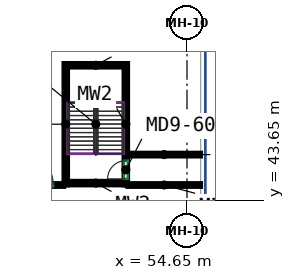
"""IFC4 building model, lengths in metres.
Left out: names, types, materials, properties, quantities, classifications, styles, units other than length and angle.
Written with IfcOpenShell. Run it as: python <this file> out.ifc"""

import sys

from ifc_helpers import new_model, si_unit, direction, frame, frame_2d, origin, place, context, subcontext, project, spatial, rectangle, extrude, source, transform, mapped, element, fill, save


model = new_model("IFC4")
c1 = context("Model", 3, precision=1e-05, world=origin(), true_north=direction((0.0, 1.0)))
c2 = subcontext(c1, "Body", "Model", "MODEL_VIEW")
j1 = project(units=[si_unit("LENGTHUNIT", "METRE"), si_unit("PLANEANGLEUNIT", "RADIAN")], contexts=[c1])
p1 = place(None, origin())
s1 = spatial("IfcSite", under=j1, at=p1, CompositionType="ELEMENT")
p2 = place(p1, origin())
s2 = spatial("IfcBuilding", under=s1, at=p2, CompositionType="ELEMENT")
p3 = place(p2, origin())
s3 = spatial("IfcBuildingStorey", under=s2, at=p3, CompositionType="ELEMENT", Elevation=0.0)
m1 = source(origin(), c2, "Body", "SweptSolid", [
    extrude(rectangle(XDim=8.0, YDim=0.25, at=frame_2d((4.0, 0.0))), origin(), (0.0, 0.0, 1.0), 8.6),
])
p4 = place(p3, frame((46.675, 44.65, 0.0), z_axis=(0.0, 0.0, 1.0), x_axis=(0.0, 1.0, 0.0)))
e1 = element("IfcWall", 1, at=p4, inside=s3, PredefinedType="SHEAR", context=c2, shape_type="MappedRepresentation", body=[
    mapped(m1, transform((0.0, 0.0, 0.0))),
])
p5 = place(p3, frame((50.625, 44.65, 0.0), z_axis=(0.0, 0.0, 1.0), x_axis=(0.0, 1.0, 0.0)))
e2 = element("IfcWall", 2, at=p5, inside=s3, PredefinedType="SHEAR", context=c2, shape_type="MappedRepresentation", body=[
    mapped(m1, transform((0.0, 0.0, 0.0))),
])
p6 = place(p5, frame((0.4, 0.0, 0.0)))
e3 = element("IfcOpeningElement", 3, at=p6, cuts=e2, PredefinedType="OPENING", context=c2, shape_type="SweptSolid", body=[
    extrude(rectangle(XDim=1.2, YDim=2.1, at=frame_2d((0.6, 1.05))), frame((0.0, 0.135, 0.0), z_axis=(0.0, -1.0, 0.0), x_axis=(1.0, 0.0, 0.0)), (0.0, 0.0, 1.0), 0.27),
])
m2 = source(origin(), c2, "Body", "SweptSolid", [
    extrude(rectangle(XDim=3.7, YDim=0.25, at=frame_2d((1.85, 0.0))), origin(), (0.0, 0.0, 1.0), 8.6),
])
for number, where, z_axis, x_axis in (
    (4, (46.8, 44.775, 0.0), (0.0, 0.0, 1.0), (1.0, 0.0, 0.0)),
    (5, (46.8, 52.525, 0.0), (0.0, 0.0, 1.0), (1.0, 0.0, 0.0)),
):
    element("IfcWall", number, at=place(p3, frame(where, z_axis=z_axis, x_axis=x_axis)), inside=s3, PredefinedType="SHEAR", context=c2, shape_type="MappedRepresentation", body=[
        mapped(m2, transform((0.0, 0.0, 0.0))),
    ])
m3 = source(origin(), c2, "Body", "SweptSolid", [
    extrude(rectangle(XDim=28.7, YDim=0.3, at=frame_2d((14.35, 0.0))), origin(), (0.0, 0.0, 1.0), 8.6),
])
p7 = place(p3, frame((55.7, 56.85, 0.0), z_axis=(0.0, 0.0, 1.0), x_axis=(0.0, -1.0, 0.0)))
e6 = element("IfcWall", 6, at=p7, inside=s3, PredefinedType="SOLIDWALL", context=c2, shape_type="MappedRepresentation", body=[
    mapped(m3, transform((0.0, 0.0, 0.0))),
])
p8 = place(p7, frame((23.1, 0.0, 0.0)))
e7 = element("IfcOpeningElement", 7, at=p8, cuts=e6, PredefinedType="OPENING", context=c2, shape_type="SweptSolid", body=[
    extrude(rectangle(XDim=1.5, YDim=2.4, at=frame_2d((0.75, 1.2))), frame((0.0, 0.16, 0.0), z_axis=(0.0, -1.0, 0.0), x_axis=(1.0, 0.0, 0.0)), (0.0, 0.0, 1.0), 0.32),
])
p9 = place(p7, frame((15.1, 0.0, 0.0)))
e8 = element("IfcOpeningElement", 8, at=p9, cuts=e6, PredefinedType="OPENING", context=c2, shape_type="SweptSolid", body=[
    extrude(rectangle(XDim=1.5, YDim=2.4, at=frame_2d((0.75, 1.2))), frame((0.0, 0.16, 0.0), z_axis=(0.0, -1.0, 0.0), x_axis=(1.0, 0.0, 0.0)), (0.0, 0.0, 1.0), 0.32),
])
p10 = place(p7, frame((4.1, 0.0, 0.0)))
e9 = element("IfcOpeningElement", 9, at=p10, cuts=e6, PredefinedType="OPENING", context=c2, shape_type="SweptSolid", body=[
    extrude(rectangle(XDim=1.5, YDim=2.4, at=frame_2d((0.75, 1.2))), frame((0.0, 0.16, 0.0), z_axis=(0.0, -1.0, 0.0), x_axis=(1.0, 0.0, 0.0)), (0.0, 0.0, 1.0), 0.32),
])
p11 = place(p7, frame((18.35, 0.0, 0.0)))
e10 = element("IfcOpeningElement", 10, at=p11, cuts=e6, PredefinedType="OPENING", context=c2, shape_type="SweptSolid", body=[
    extrude(rectangle(XDim=1.5, YDim=2.4, at=frame_2d((0.75, 1.2))), frame((0.0, 0.16, 0.0), z_axis=(0.0, -1.0, 0.0), x_axis=(1.0, 0.0, 0.0)), (0.0, 0.0, 1.0), 0.32),
])
p12 = place(p7, frame((10.45, 0.0, 0.0)))
e11 = element("IfcOpeningElement", 11, at=p12, cuts=e6, PredefinedType="OPENING", context=c2, shape_type="SweptSolid", body=[
    extrude(rectangle(XDim=1.5, YDim=2.4, at=frame_2d((0.75, 1.2))), frame((0.0, 0.16, 0.0), z_axis=(0.0, -1.0, 0.0), x_axis=(1.0, 0.0, 0.0)), (0.0, 0.0, 1.0), 0.32),
])
p13 = place(p7, frame((7.15, 0.0, 0.6)))
e12 = element("IfcOpeningElement", 12, at=p13, cuts=e6, PredefinedType="OPENING", context=c2, shape_type="SweptSolid", body=[
    extrude(rectangle(XDim=2.4, YDim=3.0, at=frame_2d((1.2, 1.5))), frame((0.0, 0.16, 0.0), z_axis=(0.0, -1.0, 0.0), x_axis=(1.0, 0.0, 0.0)), (0.0, 0.0, 1.0), 0.32),
])
p14 = place(p7, frame((7.15, 0.0, 5.0)))
e13 = element("IfcOpeningElement", 13, at=p14, cuts=e6, PredefinedType="OPENING", context=c2, shape_type="SweptSolid", body=[
    extrude(rectangle(XDim=2.4, YDim=2.0, at=frame_2d((1.2, 1.0))), frame((0.0, 0.16, 0.0), z_axis=(0.0, -1.0, 0.0), x_axis=(1.0, 0.0, 0.0)), (0.0, 0.0, 1.0), 0.32),
])
m4 = source(origin(), c2, "Body", "SweptSolid", [
    extrude(rectangle(XDim=3.8, YDim=0.2, at=frame_2d((1.9, 0.0))), origin(), (0.0, 0.0, 1.0), 7.7),
])
p15 = place(p3, frame((42.75, 44.65, 0.0), z_axis=(0.0, 0.0, 1.0), x_axis=(1.0, 0.0, 0.0)))
e14 = element("IfcWall", 14, at=p15, inside=s3, PredefinedType="PARTITIONING", context=c2, shape_type="MappedRepresentation", body=[
    mapped(m4, transform((0.0, 0.0, 0.0))),
])
p16 = place(p15, frame((0.7, 0.0, 0.0)))
e15 = element("IfcOpeningElement", 15, at=p16, cuts=e14, PredefinedType="OPENING", context=c2, shape_type="SweptSolid", body=[
    extrude(rectangle(XDim=2.4, YDim=2.4, at=frame_2d((1.2, 1.2))), frame((0.0, 0.11, 0.0), z_axis=(0.0, -1.0, 0.0), x_axis=(1.0, 0.0, 0.0)), (0.0, 0.0, 1.0), 0.22),
])
m5 = source(origin(), c2, "Body", "SweptSolid", [
    extrude(rectangle(XDim=4.8, YDim=0.2, at=frame_2d((2.4, 0.0))), origin(), (0.0, 0.0, 1.0), 7.7),
])
for number, where, z_axis, x_axis in (
    (16, (50.75, 44.65, 0.0), (0.0, 0.0, 1.0), (1.0, 0.0, 0.0)),
    (17, (55.55, 46.65, 0.0), (0.0, 0.0, 1.0), (-1.0, 0.0, 0.0)),
):
    element("IfcWall", number, at=place(p3, frame(where, z_axis=z_axis, x_axis=x_axis)), inside=s3, PredefinedType="PARTITIONING", context=c2, shape_type="MappedRepresentation", body=[
        mapped(m5, transform((0.0, 0.0, 0.0))),
    ])
p17 = place(p10, origin())
e18 = element("IfcDoor", 18, at=p17, inside=s3, OperationType="DOUBLE_DOOR_SINGLE_SWING", PredefinedType="DOOR", context=c2, shape_type="SweptSolid", body=[
    extrude(rectangle(XDim=1.5, YDim=2.4, at=frame_2d((0.75, 1.2))), frame((0.0, 0.025, 0.0), z_axis=(0.0, -1.0, 0.0), x_axis=(1.0, 0.0, 0.0)), (0.0, 0.0, 1.0), 0.05),
])
fill(e9, e18)
p18 = place(p12, origin())
e19 = element("IfcDoor", 19, at=p18, inside=s3, OperationType="DOUBLE_DOOR_SINGLE_SWING", PredefinedType="DOOR", context=c2, shape_type="SweptSolid", body=[
    extrude(rectangle(XDim=1.5, YDim=2.4, at=frame_2d((0.75, 1.2))), frame((0.0, 0.025, 0.0), z_axis=(0.0, -1.0, 0.0), x_axis=(1.0, 0.0, 0.0)), (0.0, 0.0, 1.0), 0.05),
])
fill(e11, e19)
p19 = place(p13, origin())
e20 = element("IfcWindow", 20, at=p19, inside=s3, PartitioningType="SINGLE_PANEL", PredefinedType="WINDOW", context=c2, shape_type="SweptSolid", body=[
    extrude(rectangle(XDim=2.4, YDim=3.0, at=frame_2d((1.2, 1.5))), frame((0.0, 0.03, 0.0), z_axis=(0.0, -1.0, 0.0), x_axis=(1.0, 0.0, 0.0)), (0.0, 0.0, 1.0), 0.06),
])
fill(e12, e20)
p20 = place(p14, origin())
e21 = element("IfcWindow", 21, at=p20, inside=s3, PartitioningType="SINGLE_PANEL", PredefinedType="WINDOW", context=c2, shape_type="SweptSolid", body=[
    extrude(rectangle(XDim=2.4, YDim=2.0, at=frame_2d((1.2, 1.0))), frame((0.0, 0.03, 0.0), z_axis=(0.0, -1.0, 0.0), x_axis=(1.0, 0.0, 0.0)), (0.0, 0.0, 1.0), 0.06),
])
fill(e13, e21)
p21 = place(p6, origin())
e22 = element("IfcDoor", 22, at=p21, inside=s3, OperationType="DOUBLE_DOOR_SINGLE_SWING", PredefinedType="DOOR", context=c2, shape_type="SweptSolid", body=[
    extrude(rectangle(XDim=1.2, YDim=2.1, at=frame_2d((0.6, 1.05))), frame((0.0, 0.025, 0.0), z_axis=(0.0, -1.0, 0.0), x_axis=(1.0, 0.0, 0.0)), (0.0, 0.0, 1.0), 0.05),
])
fill(e3, e22)
p22 = place(p16, origin())
e23 = element("IfcDoor", 23, at=p22, inside=s3, OperationType="DOUBLE_DOOR_SINGLE_SWING", PredefinedType="DOOR", context=c2, shape_type="SweptSolid", body=[
    extrude(rectangle(XDim=2.4, YDim=2.4, at=frame_2d((1.2, 1.2))), frame((0.0, 0.025, 0.0), z_axis=(0.0, -1.0, 0.0), x_axis=(1.0, 0.0, 0.0)), (0.0, 0.0, 1.0), 0.05),
])
fill(e15, e23)
save(model, sys.argv[1])
